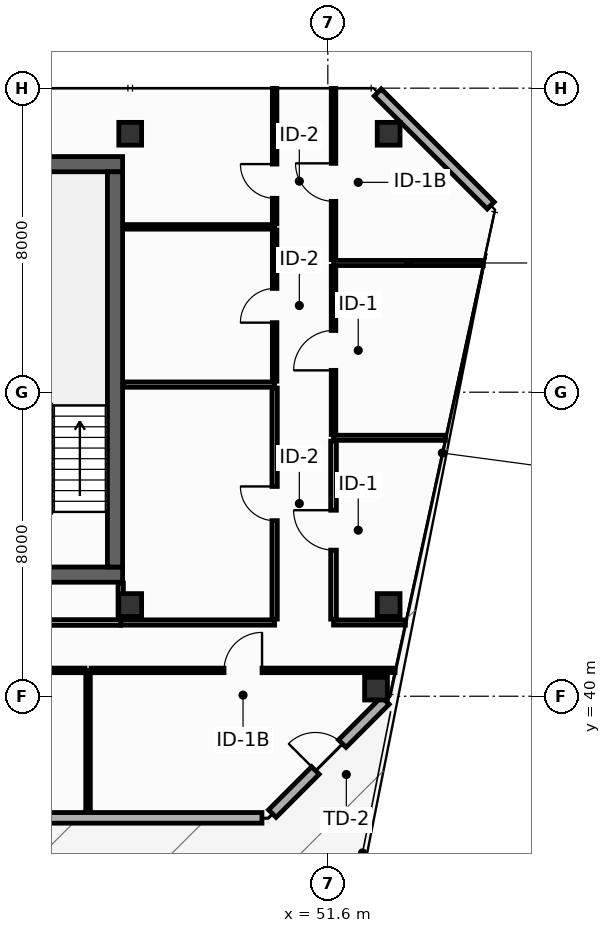
"""IFC4 building model, lengths in metres.
Left out: names, types, materials, properties, quantities, classifications, styles, units other than length and angle.
Written with IfcOpenShell. Run it as: python <this file> out.ifc"""

import sys

from ifc_helpers import new_model, si_unit, direction, frame, frame_2d, origin, origin_2d, place, context, subcontext, project, spatial, rectangle, hollow_rectangle, extrude, element, fill, save


model = new_model("IFC4")
c1 = context("Model", 3, precision=1e-05, world=origin(), true_north=direction((0.0, 1.0)))
c2 = subcontext(c1, "Body", "Model", "MODEL_VIEW")
j1 = project(units=[si_unit("LENGTHUNIT", "METRE"), si_unit("PLANEANGLEUNIT", "RADIAN")], contexts=[c1])
p1 = place(None, origin())
s1 = spatial("IfcSite", under=j1, at=p1, CompositionType="ELEMENT")
p2 = place(p1, origin())
s2 = spatial("IfcBuilding", under=s1, at=p2, CompositionType="ELEMENT")
p3 = place(p2, frame((0.0, 0.0, 310.4)))
s3 = spatial("IfcBuildingStorey", under=s2, at=p3, CompositionType="ELEMENT", Elevation=310.4)
p4 = place(p3, frame((13.7, 43.2, 0.0), z_axis=(0.0, 0.0, 1.0), x_axis=(1.0, 0.0, 0.0)))
e1 = element("IfcWall", 1, at=p4, inside=s3, PredefinedType="SHEAR", context=c2, shape_type="SweptSolid", body=[
    extrude(rectangle(XDim=32.5, YDim=0.4, at=frame_2d((16.25, 0.0))), origin(), (0.0, 0.0, 1.0), 3.55),
])
p5 = place(p4, frame((5.4, 0.0, 0.0)))
e2 = element("IfcOpeningElement", 2, at=p5, cuts=e1, PredefinedType="OPENING", context=c2, shape_type="SweptSolid", body=[
    extrude(rectangle(XDim=1.1, YDim=2.15, at=frame_2d((0.55, 1.075))), frame((0.0, 0.21, 0.0), z_axis=(0.0, -1.0, 0.0), x_axis=(1.0, 0.0, 0.0)), (0.0, 0.0, 1.0), 0.42),
])
p6 = place(p4, frame((25.6, 0.0, 0.0)))
e3 = element("IfcOpeningElement", 3, at=p6, cuts=e1, PredefinedType="OPENING", context=c2, shape_type="SweptSolid", body=[
    extrude(rectangle(XDim=1.1, YDim=2.15, at=frame_2d((0.55, 1.075))), frame((0.0, 0.21, 0.0), z_axis=(0.0, -1.0, 0.0), x_axis=(1.0, 0.0, 0.0)), (0.0, 0.0, 1.0), 0.42),
])
p7 = place(p3, frame((13.7, 54.0, 0.0), z_axis=(0.0, 0.0, 1.0), x_axis=(1.0, 0.0, 0.0)))
e4 = element("IfcWall", 4, at=p7, inside=s3, PredefinedType="SHEAR", context=c2, shape_type="SweptSolid", body=[
    extrude(rectangle(XDim=32.5, YDim=0.4, at=frame_2d((16.25, 0.0))), origin(), (0.0, 0.0, 1.0), 3.55),
])
p8 = place(p3, frame((46.0, 43.4, 0.0), z_axis=(0.0, 0.0, 1.0), x_axis=(0.0, 1.0, 0.0)))
e5 = element("IfcWall", 5, at=p8, inside=s3, PredefinedType="SHEAR", context=c2, shape_type="SweptSolid", body=[
    extrude(rectangle(XDim=10.4, YDim=0.4, at=frame_2d((5.2, 0.0))), origin(), (0.0, 0.0, 1.0), 3.55),
])
for number, where, z_axis, x_axis in (
    (6, (46.4, 54.8, 0.0), (0.0, 0.0, 1.0), (1.0, 0.0, 0.0)),
    (7, (53.2, 54.8, 0.0), (0.0, 0.0, 1.0), (1.0, 0.0, 0.0)),
    (8, (46.4, 42.4, 0.0), (0.0, 0.0, 1.0), (1.0, 0.0, 0.0)),
    (9, (53.2, 42.4, 0.0), (0.0, 0.0, 1.0), (1.0, 0.0, 0.0)),
    (10, (52.868, 40.2, 0.0), (0.0, 0.0, 1.0), (1.0, 0.0, 0.0)),
):
    element("IfcColumn", number, at=place(p3, frame(where, z_axis=z_axis, x_axis=x_axis)), inside=s3, PredefinedType="COLUMN", context=c2, shape_type="SweptSolid", body=[
        extrude(hollow_rectangle(XDim=0.6, YDim=0.6, WallThickness=0.028, at=origin_2d()), origin(), (0.0, 0.0, 1.0), 3.8),
    ])
p9 = place(p3, frame((35.66, 36.8, 0.0), z_axis=(0.0, 0.0, 1.0), x_axis=(1.0, 0.0, 0.0)))
e11 = element("IfcWall", 11, at=p9, inside=s3, PredefinedType="STANDARD", context=c2, shape_type="SweptSolid", body=[
    extrude(rectangle(XDim=14.207, YDim=0.28, at=frame_2d((7.104, 0.0))), origin(), (0.0, 0.0, 1.0), 3.55),
])
p10 = place(p9, frame((6.603, 0.0, 0.0)))
e12 = element("IfcOpeningElement", 12, at=p10, cuts=e11, PredefinedType="OPENING", context=c2, shape_type="SweptSolid", body=[
    extrude(rectangle(XDim=1.0, YDim=2.2, at=frame_2d((0.5, 1.1))), frame((0.0, 0.15, 0.0), z_axis=(0.0, -1.0, 0.0), x_axis=(1.0, 0.0, 0.0)), (0.0, 0.0, 1.0), 0.3),
])
p11 = place(p3, frame((50.14, 36.913, 0.0), z_axis=(0.0, 0.0, 1.0), x_axis=(0.70707775441, 0.707135806771, 0.0)))
e13 = element("IfcWall", 13, at=p11, inside=s3, PredefinedType="STANDARD", context=c2, shape_type="SweptSolid", body=[
    extrude(rectangle(XDim=4.206, YDim=0.28, at=frame_2d((2.103, 0.0))), origin(), (0.0, 0.0, 1.0), 3.55),
])
p12 = place(p11, frame((1.603, 0.0, 0.0)))
e14 = element("IfcOpeningElement", 14, at=p12, cuts=e13, PredefinedType="OPENING", context=c2, shape_type="SweptSolid", body=[
    extrude(rectangle(XDim=1.0, YDim=2.2, at=frame_2d((0.5, 1.1))), frame((0.0, 0.15, 0.0), z_axis=(0.0, -1.0, 0.0), x_axis=(1.0, 0.0, 0.0)), (0.0, 0.0, 1.0), 0.3),
])
p13 = place(p3, frame((55.887, 52.913, 0.0), z_axis=(0.0, 0.0, 1.0), x_axis=(-0.707106781187, 0.707106781187, 0.0)))
e15 = element("IfcWall", 15, at=p13, inside=s3, PredefinedType="STANDARD", context=c2, shape_type="SweptSolid", body=[
    extrude(rectangle(XDim=4.206, YDim=0.26, at=frame_2d((2.103, 0.0))), origin(), (0.0, 0.0, 1.0), 3.55),
])
p14 = place(p3, frame((46.15, 41.94, 0.0), z_axis=(0.0, 0.0, 1.0), x_axis=(1.0, 0.0, 0.0)))
e16 = element("IfcWall", 16, at=p14, inside=s3, PredefinedType="PARTITIONING", context=c2, shape_type="SweptSolid", body=[
    extrude(rectangle(XDim=4.05, YDim=0.14, at=frame_2d((2.025, 0.0))), origin(), (0.0, 0.0, 1.0), 3.55),
])
p15 = place(p3, frame((46.15, 42.03, 0.0), z_axis=(0.0, 0.0, 1.0), x_axis=(0.0, 1.0, 0.0)))
e17 = element("IfcWall", 17, at=p15, inside=s3, PredefinedType="PARTITIONING", context=c2, shape_type="SweptSolid", body=[
    extrude(rectangle(XDim=0.95, YDim=0.14, at=frame_2d((0.475, 0.0))), origin(), (0.0, 0.0, 1.0), 3.55),
])
p16 = place(p3, frame((46.22, 48.2, 0.0), z_axis=(0.0, 0.0, 1.0), x_axis=(1.0, 0.0, 0.0)))
e18 = element("IfcWall", 18, at=p16, inside=s3, PredefinedType="PARTITIONING", context=c2, shape_type="SweptSolid", body=[
    extrude(rectangle(XDim=3.98, YDim=0.14, at=frame_2d((1.99, 0.0))), origin(), (0.0, 0.0, 1.0), 3.55),
])
p17 = place(p3, frame((50.2, 42.03, 0.0), z_axis=(0.0, 0.0, 1.0), x_axis=(0.0, 1.0, 0.0)))
e19 = element("IfcWall", 19, at=p17, inside=s3, PredefinedType="PARTITIONING", context=c2, shape_type="SweptSolid", body=[
    extrude(rectangle(XDim=6.08, YDim=0.14, at=frame_2d((3.04, 0.0))), origin(), (0.0, 0.0, 1.0), 2.947),
])
p18 = place(p17, frame((2.59, 0.0, 0.0)))
e20 = element("IfcOpeningElement", 20, at=p18, cuts=e19, PredefinedType="OPENING", context=c2, shape_type="SweptSolid", body=[
    extrude(rectangle(XDim=0.9, YDim=2.1, at=frame_2d((0.45, 1.05))), frame((0.0, 0.08, 0.0), z_axis=(0.0, -1.0, 0.0), x_axis=(1.0, 0.0, 0.0)), (0.0, 0.0, 1.0), 0.16),
])
p19 = place(p3, frame((46.22, 52.35, 0.0), z_axis=(0.0, 0.0, 1.0), x_axis=(1.0, 0.0, 0.0)))
e21 = element("IfcWall", 21, at=p19, inside=s3, PredefinedType="PARTITIONING", context=c2, shape_type="SweptSolid", body=[
    extrude(rectangle(XDim=3.98, YDim=0.12, at=frame_2d((1.99, 0.0))), origin(), (0.0, 0.0, 1.0), 3.55),
])
p20 = place(p3, frame((50.2, 48.29, 0.0), z_axis=(0.0, 0.0, 1.0), x_axis=(0.0, 1.0, 0.0)))
e22 = element("IfcWall", 22, at=p20, inside=s3, PredefinedType="PARTITIONING", context=c2, shape_type="SweptSolid", body=[
    extrude(rectangle(XDim=3.98, YDim=0.12, at=frame_2d((1.99, 0.0))), origin(), (0.0, 0.0, 1.0), 3.55),
])
p21 = place(p20, frame((1.54, 0.0, 0.0)))
e23 = element("IfcOpeningElement", 23, at=p21, cuts=e22, PredefinedType="OPENING", context=c2, shape_type="SweptSolid", body=[
    extrude(rectangle(XDim=0.9, YDim=2.1, at=frame_2d((0.45, 1.05))), frame((0.0, 0.07, 0.0), z_axis=(0.0, -1.0, 0.0), x_axis=(1.0, 0.0, 0.0)), (0.0, 0.0, 1.0), 0.14),
])
p22 = place(p3, frame((50.2, 52.43, 0.0), z_axis=(0.0, 0.0, 1.0), x_axis=(0.0, 1.0, 0.0)))
e24 = element("IfcWall", 24, at=p22, inside=s3, PredefinedType="PARTITIONING", context=c2, shape_type="SweptSolid", body=[
    extrude(rectangle(XDim=3.565, YDim=0.12, at=frame_2d((1.783, 0.0))), origin(), (0.0, 0.0, 1.0), 2.935),
])
p23 = place(p22, frame((0.672, 0.0, 0.0)))
e25 = element("IfcOpeningElement", 25, at=p23, cuts=e24, PredefinedType="OPENING", context=c2, shape_type="SweptSolid", body=[
    extrude(rectangle(XDim=0.9, YDim=2.1, at=frame_2d((0.45, 1.05))), frame((0.0, 0.07, 0.0), z_axis=(0.0, -1.0, 0.0), x_axis=(1.0, 0.0, 0.0)), (0.0, 0.0, 1.0), 0.14),
])
p24 = place(p3, frame((51.75, 41.94, 0.0), z_axis=(0.0, 0.0, 1.0), x_axis=(1.0, 0.0, 0.0)))
e26 = element("IfcWall", 26, at=p24, inside=s3, PredefinedType="PARTITIONING", context=c2, shape_type="SweptSolid", body=[
    extrude(rectangle(XDim=1.892, YDim=0.135, at=frame_2d((0.946, 0.0))), origin(), (0.0, 0.0, 1.0), 3.085),
])
p25 = place(p3, frame((51.75, 46.8, 0.0), z_axis=(0.0, 0.0, 1.0), x_axis=(1.0, 0.0, 0.0)))
e27 = element("IfcWall", 27, at=p25, inside=s3, PredefinedType="PARTITIONING", context=c2, shape_type="SweptSolid", body=[
    extrude(rectangle(XDim=2.945, YDim=0.135, at=frame_2d((1.472, 0.0))), origin(), (0.0, 0.0, 1.0), 2.947),
])
p26 = place(p3, frame((51.75, 51.4, 0.0), z_axis=(0.0, 0.0, 1.0), x_axis=(1.0, 0.0, 0.0)))
e28 = element("IfcWall", 28, at=p26, inside=s3, PredefinedType="PARTITIONING", context=c2, shape_type="SweptSolid", body=[
    extrude(rectangle(XDim=3.942, YDim=0.135, at=frame_2d((1.971, 0.0))), origin(), (0.0, 0.0, 1.0), 2.947),
])
p27 = place(p3, frame((51.75, 42.028, 0.0), z_axis=(0.0, 0.0, 1.0), x_axis=(0.0, 1.0, 0.0)))
e29 = element("IfcWall", 29, at=p27, inside=s3, PredefinedType="PARTITIONING", context=c2, shape_type="SweptSolid", body=[
    extrude(rectangle(XDim=4.685, YDim=0.15, at=frame_2d((2.342, 0.0))), origin(), (0.0, 0.0, 1.0), 2.947),
])
p28 = place(p27, frame((1.817, 0.0, 0.0)))
e30 = element("IfcOpeningElement", 30, at=p28, cuts=e29, PredefinedType="OPENING", context=c2, shape_type="SweptSolid", body=[
    extrude(rectangle(XDim=1.05, YDim=2.15, at=frame_2d((0.525, 1.075))), frame((0.0, 0.085, 0.0), z_axis=(0.0, -1.0, 0.0), x_axis=(1.0, 0.0, 0.0)), (0.0, 0.0, 1.0), 0.17),
])
p29 = place(p3, frame((51.75, 46.887, 0.0), z_axis=(0.0, 0.0, 1.0), x_axis=(0.0, 1.0, 0.0)))
e31 = element("IfcWall", 31, at=p29, inside=s3, PredefinedType="PARTITIONING", context=c2, shape_type="SweptSolid", body=[
    extrude(rectangle(XDim=4.425, YDim=0.12, at=frame_2d((2.212, 0.0))), origin(), (0.0, 0.0, 1.0), 3.55),
])
p30 = place(p29, frame((1.687, 0.0, 0.0)))
e32 = element("IfcOpeningElement", 32, at=p30, cuts=e31, PredefinedType="OPENING", context=c2, shape_type="SweptSolid", body=[
    extrude(rectangle(XDim=1.05, YDim=2.15, at=frame_2d((0.525, 1.075))), frame((0.0, 0.07, 0.0), z_axis=(0.0, -1.0, 0.0), x_axis=(1.0, 0.0, 0.0)), (0.0, 0.0, 1.0), 0.14),
])
p31 = place(p3, frame((51.75, 51.488, 0.0), z_axis=(0.0, 0.0, 1.0), x_axis=(0.0, 1.0, 0.0)))
e33 = element("IfcWall", 33, at=p31, inside=s3, PredefinedType="PARTITIONING", context=c2, shape_type="SweptSolid", body=[
    extrude(rectangle(XDim=4.508, YDim=0.12, at=frame_2d((2.254, 0.0))), origin(), (0.0, 0.0, 1.0), 2.935),
])
p32 = place(p31, frame((1.534, 0.0, 0.0)))
e34 = element("IfcOpeningElement", 34, at=p32, cuts=e33, PredefinedType="OPENING", context=c2, shape_type="SweptSolid", body=[
    extrude(rectangle(XDim=1.0, YDim=2.15, at=frame_2d((0.5, 1.075))), frame((0.0, 0.07, 0.0), z_axis=(0.0, -1.0, 0.0), x_axis=(1.0, 0.0, 0.0)), (0.0, 0.0, 1.0), 0.14),
])
p33 = place(p3, frame((40.995, 41.94, 0.0), z_axis=(0.0, 0.0, 1.0), x_axis=(1.0, 0.0, 0.0)))
e35 = element("IfcWall", 35, at=p33, inside=s3, PredefinedType="PARTITIONING", context=c2, shape_type="SweptSolid", body=[
    extrude(rectangle(XDim=5.155, YDim=0.15, at=frame_2d((2.577, 0.0))), origin(), (0.0, 0.0, 1.0), 3.55),
])
p34 = place(p33, frame((2.078, 0.0, 0.0)))
e36 = element("IfcOpeningElement", 36, at=p34, cuts=e35, PredefinedType="OPENING", context=c2, shape_type="SweptSolid", body=[
    extrude(rectangle(XDim=1.0, YDim=2.15, at=frame_2d((0.5, 1.075))), frame((0.0, 0.085, 0.0), z_axis=(0.0, -1.0, 0.0), x_axis=(1.0, 0.0, 0.0)), (0.0, 0.0, 1.0), 0.17),
])
p35 = place(p3, frame((45.29, 36.96, 0.0), z_axis=(0.0, 0.0, 1.0), x_axis=(0.0, 1.0, 0.0)))
e37 = element("IfcWall", 37, at=p35, inside=s3, PredefinedType="PARTITIONING", context=c2, shape_type="SweptSolid", body=[
    extrude(rectangle(XDim=3.72, YDim=0.12, at=frame_2d((1.86, 0.0))), origin(), (0.0, 0.0, 1.0), 3.55),
])
p36 = place(p3, frame((36.067, 40.68, 0.0), z_axis=(0.0, 0.0, 1.0), x_axis=(1.0, 0.0, 0.0)))
e38 = element("IfcWall", 38, at=p36, inside=s3, PredefinedType="PARTITIONING", context=c2, shape_type="SweptSolid", body=[
    extrude(rectangle(XDim=9.143, YDim=0.12, at=frame_2d((4.571, 0.0))), origin(), (0.0, 0.0, 1.0), 3.55),
])
p37 = place(p36, frame((4.046, 0.0, 0.0)))
e39 = element("IfcOpeningElement", 39, at=p37, cuts=e38, PredefinedType="OPENING", context=c2, shape_type="SweptSolid", body=[
    extrude(rectangle(XDim=1.05, YDim=2.15, at=frame_2d((0.525, 1.075))), frame((0.0, 0.07, 0.0), z_axis=(0.0, -1.0, 0.0), x_axis=(1.0, 0.0, 0.0)), (0.0, 0.0, 1.0), 0.14),
])
p38 = place(p3, frame((45.37, 40.68, 0.0), z_axis=(0.0, 0.0, 1.0), x_axis=(1.0, 0.0, 0.0)))
e40 = element("IfcWall", 40, at=p38, inside=s3, PredefinedType="PARTITIONING", context=c2, shape_type="SweptSolid", body=[
    extrude(rectangle(XDim=7.999, YDim=0.12, at=frame_2d((4.0, 0.0))), origin(), (0.0, 0.0, 1.0), 3.085),
])
p39 = place(p38, frame((3.499, 0.0, 0.0)))
e41 = element("IfcOpeningElement", 41, at=p39, cuts=e40, PredefinedType="OPENING", context=c2, shape_type="SweptSolid", body=[
    extrude(rectangle(XDim=1.0, YDim=2.15, at=frame_2d((0.5, 1.075))), frame((0.0, 0.07, 0.0), z_axis=(0.0, -1.0, 0.0), x_axis=(1.0, 0.0, 0.0)), (0.0, 0.0, 1.0), 0.14),
])
p40 = place(p12, origin())
e42 = element("IfcDoor", 42, at=p40, inside=s3, OperationType="SINGLE_SWING_LEFT", PredefinedType="DOOR", context=c2, shape_type="SweptSolid", body=[
    extrude(rectangle(XDim=1.0, YDim=2.2, at=frame_2d((0.5, 1.1))), frame((0.0, 0.025, 0.0), z_axis=(0.0, -1.0, 0.0), x_axis=(1.0, 0.0, 0.0)), (0.0, 0.0, 1.0), 0.05),
])
fill(e14, e42)
p41 = place(p18, origin())
e43 = element("IfcDoor", 43, at=p41, inside=s3, OperationType="SINGLE_SWING_RIGHT", PredefinedType="DOOR", context=c2, shape_type="SweptSolid", body=[
    extrude(rectangle(XDim=0.9, YDim=2.1, at=frame_2d((0.45, 1.05))), frame((0.0, 0.025, 0.0), z_axis=(0.0, -1.0, 0.0), x_axis=(1.0, 0.0, 0.0)), (0.0, 0.0, 1.0), 0.05),
])
fill(e20, e43)
p42 = place(p21, origin())
e44 = element("IfcDoor", 44, at=p42, inside=s3, OperationType="SINGLE_SWING_LEFT", PredefinedType="DOOR", context=c2, shape_type="SweptSolid", body=[
    extrude(rectangle(XDim=0.9, YDim=2.1, at=frame_2d((0.45, 1.05))), frame((0.0, 0.025, 0.0), z_axis=(0.0, -1.0, 0.0), x_axis=(1.0, 0.0, 0.0)), (0.0, 0.0, 1.0), 0.05),
])
fill(e23, e44)
p43 = place(p23, origin())
e45 = element("IfcDoor", 45, at=p43, inside=s3, OperationType="SINGLE_SWING_RIGHT", PredefinedType="DOOR", context=c2, shape_type="SweptSolid", body=[
    extrude(rectangle(XDim=0.9, YDim=2.1, at=frame_2d((0.45, 1.05))), frame((0.0, 0.025, 0.0), z_axis=(0.0, -1.0, 0.0), x_axis=(1.0, 0.0, 0.0)), (0.0, 0.0, 1.0), 0.05),
])
fill(e25, e45)
p44 = place(p28, origin())
e46 = element("IfcDoor", 46, at=p44, inside=s3, OperationType="SINGLE_SWING_RIGHT", PredefinedType="DOOR", context=c2, shape_type="SweptSolid", body=[
    extrude(rectangle(XDim=1.05, YDim=2.15, at=frame_2d((0.525, 1.075))), frame((0.0, 0.025, 0.0), z_axis=(0.0, -1.0, 0.0), x_axis=(1.0, 0.0, 0.0)), (0.0, 0.0, 1.0), 0.05),
])
fill(e30, e46)
p45 = place(p30, origin())
e47 = element("IfcDoor", 47, at=p45, inside=s3, OperationType="SINGLE_SWING_LEFT", PredefinedType="DOOR", context=c2, shape_type="SweptSolid", body=[
    extrude(rectangle(XDim=1.05, YDim=2.15, at=frame_2d((0.525, 1.075))), frame((0.0, 0.025, 0.0), z_axis=(0.0, -1.0, 0.0), x_axis=(1.0, 0.0, 0.0)), (0.0, 0.0, 1.0), 0.05),
])
fill(e32, e47)
p46 = place(p32, origin())
e48 = element("IfcDoor", 48, at=p46, inside=s3, OperationType="SINGLE_SWING_RIGHT", PredefinedType="DOOR", context=c2, shape_type="SweptSolid", body=[
    extrude(rectangle(XDim=1.0, YDim=2.15, at=frame_2d((0.5, 1.075))), frame((0.0, 0.025, 0.0), z_axis=(0.0, -1.0, 0.0), x_axis=(1.0, 0.0, 0.0)), (0.0, 0.0, 1.0), 0.05),
])
fill(e34, e48)
p47 = place(p39, origin())
e49 = element("IfcDoor", 49, at=p47, inside=s3, OperationType="SINGLE_SWING_RIGHT", PredefinedType="DOOR", context=c2, shape_type="SweptSolid", body=[
    extrude(rectangle(XDim=1.0, YDim=2.15, at=frame_2d((0.5, 1.075))), frame((0.0, 0.025, 0.0), z_axis=(0.0, -1.0, 0.0), x_axis=(1.0, 0.0, 0.0)), (0.0, 0.0, 1.0), 0.05),
])
fill(e41, e49)
save(model, sys.argv[1])
